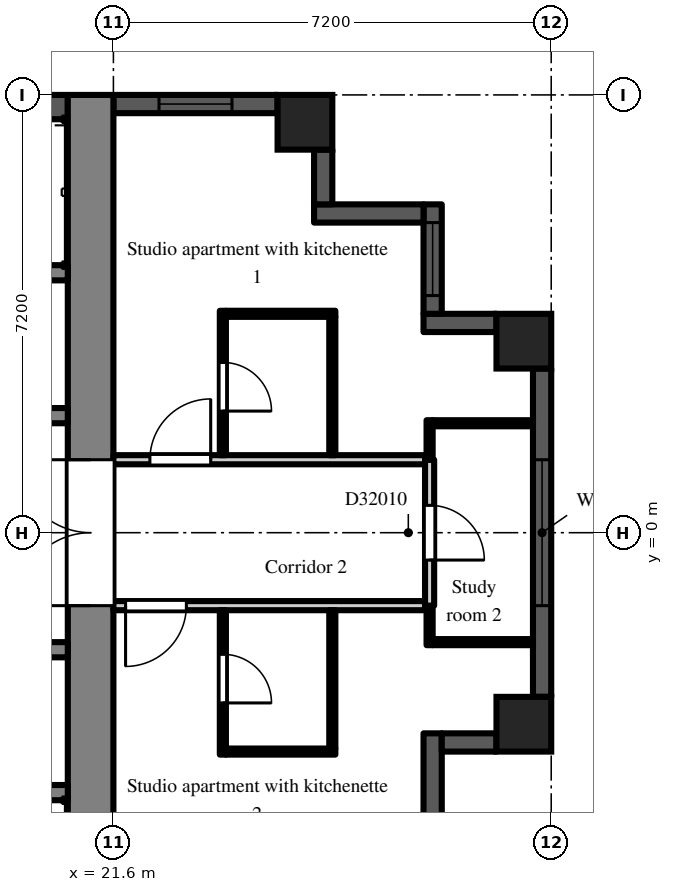
"""IFC4 building model, lengths in metres.
Left out: names, types, materials, properties, quantities, classifications, styles, units other than length and angle.
Written with IfcOpenShell. Run it as: python <this file> out.ifc"""

import sys

from ifc_helpers import new_model, si_unit, direction, frame, frame_2d, origin, origin_2d, place, context, subcontext, project, spatial, rectangle, extrude, element, fill, save


model = new_model("IFC4")
c1 = context("Model", 3, precision=1e-05, world=origin(), true_north=direction((0.0, 1.0)))
c2 = subcontext(c1, "Body", "Model", "MODEL_VIEW")
j1 = project(units=[si_unit("LENGTHUNIT", "METRE"), si_unit("PLANEANGLEUNIT", "RADIAN")], contexts=[c1])
p1 = place(None, origin())
s1 = spatial("IfcSite", under=j1, at=p1, CompositionType="ELEMENT")
p2 = place(p1, origin())
s2 = spatial("IfcBuilding", under=s1, at=p2, CompositionType="ELEMENT")
p3 = place(p2, frame((0.0, 0.0, 225.9)))
s3 = spatial("IfcBuildingStorey", under=s2, at=p3, CompositionType="ELEMENT", Elevation=225.9)
for number, where, z_axis, x_axis in (
    (1, (24.75, 6.75, 0.0), (0.0, 0.0, 1.0), (1.0, 0.0, 0.0)),
    (2, (28.35, -3.15, 0.0), (0.0, 0.0, 1.0), (1.0, 0.0, 0.0)),
    (3, (28.35, 3.15, 0.0), (0.0, 0.0, 1.0), (1.0, 0.0, 0.0)),
):
    element("IfcColumn", number, at=place(p3, frame(where, z_axis=z_axis, x_axis=x_axis)), inside=s3, PredefinedType="COLUMN", context=c2, shape_type="SweptSolid", body=[
        extrude(rectangle(XDim=0.9, YDim=0.9, at=origin_2d()), origin(), (0.0, 0.0, 1.0), 3.0),
    ])
p4 = place(p3, frame((26.85, -5.1, 0.0), z_axis=(0.0, 0.0, 1.0), x_axis=(0.0, 1.0, 0.0)))
e4 = element("IfcWall", 4, at=p4, inside=s3, PredefinedType="SOLIDWALL", context=c2, shape_type="SweptSolid", body=[
    extrude(rectangle(XDim=1.8, YDim=0.3, at=frame_2d((0.9, 0.0))), origin(), (0.0, 0.0, 1.0), 2.6),
])
p5 = place(p3, frame((27.0, -3.45, 0.0), z_axis=(0.0, 0.0, 1.0), x_axis=(1.0, 0.0, 0.0)))
e5 = element("IfcWall", 5, at=p5, inside=s3, PredefinedType="SOLIDWALL", context=c2, shape_type="SweptSolid", body=[
    extrude(rectangle(XDim=0.9, YDim=0.3, at=frame_2d((0.45, 0.0))), origin(), (0.0, 0.0, 1.0), 2.6),
])
p6 = place(p3, frame((28.65, -2.7, 0.0), z_axis=(0.0, 0.0, 1.0), x_axis=(0.0, 1.0, 0.0)))
e6 = element("IfcWall", 6, at=p6, inside=s3, PredefinedType="SOLIDWALL", context=c2, shape_type="SweptSolid", body=[
    extrude(rectangle(XDim=5.4, YDim=0.3, at=frame_2d((2.7, 0.0))), origin(), (0.0, 0.0, 1.0), 2.3),
])
p7 = place(p6, frame((1.5, 0.0, 0.2)))
e7 = element("IfcOpeningElement", 7, at=p7, cuts=e6, PredefinedType="OPENING", context=c2, shape_type="SweptSolid", body=[
    extrude(rectangle(XDim=2.4, YDim=1.85, at=frame_2d((1.2, 0.925))), frame((0.0, 0.16, 0.0), z_axis=(0.0, -1.0, 0.0), x_axis=(1.0, 0.0, 0.0)), (0.0, 0.0, 1.0), 0.32),
])
p8 = place(p3, frame((27.9, 3.45, 0.0), z_axis=(0.0, 0.0, 1.0), x_axis=(-1.0, 0.0, 0.0)))
e8 = element("IfcWall", 8, at=p8, inside=s3, PredefinedType="SOLIDWALL", context=c2, shape_type="SweptSolid", body=[
    extrude(rectangle(XDim=1.2, YDim=0.3, at=frame_2d((0.6, 0.0))), origin(), (0.0, 0.0, 1.0), 2.6),
])
p9 = place(p3, frame((26.85, 3.6, 0.0), z_axis=(0.0, 0.0, 1.0), x_axis=(0.0, 1.0, 0.0)))
e9 = element("IfcWall", 9, at=p9, inside=s3, PredefinedType="SOLIDWALL", context=c2, shape_type="SweptSolid", body=[
    extrude(rectangle(XDim=1.8, YDim=0.3, at=frame_2d((0.9, 0.0))), origin(), (0.0, 0.0, 1.0), 2.6),
])
p10 = place(p9, frame((0.3, 0.0, 0.2)))
e10 = element("IfcOpeningElement", 10, at=p10, cuts=e9, PredefinedType="OPENING", context=c2, shape_type="SweptSolid", body=[
    extrude(rectangle(XDim=1.2, YDim=1.85, at=frame_2d((0.6, 0.925))), frame((0.0, 0.16, 0.0), z_axis=(0.0, -1.0, 0.0), x_axis=(1.0, 0.0, 0.0)), (0.0, 0.0, 1.0), 0.32),
])
p11 = place(p3, frame((26.7, 5.25, 0.0), z_axis=(0.0, 0.0, 1.0), x_axis=(-1.0, 0.0, 0.0)))
e11 = element("IfcWall", 11, at=p11, inside=s3, PredefinedType="SOLIDWALL", context=c2, shape_type="SweptSolid", body=[
    extrude(rectangle(XDim=1.8, YDim=0.3, at=frame_2d((0.9, 0.0))), origin(), (0.0, 0.0, 1.0), 2.6),
])
p12 = place(p3, frame((25.05, 5.4, 0.0), z_axis=(0.0, 0.0, 1.0), x_axis=(0.0, 1.0, 0.0)))
e12 = element("IfcWall", 12, at=p12, inside=s3, PredefinedType="SOLIDWALL", context=c2, shape_type="SweptSolid", body=[
    extrude(rectangle(XDim=0.9, YDim=0.3, at=frame_2d((0.45, 0.0))), origin(), (0.0, 0.0, 1.0), 2.6),
])
p13 = place(p3, frame((24.3, 7.05, 0.0), z_axis=(0.0, 0.0, 1.0), x_axis=(-1.0, 0.0, 0.0)))
e13 = element("IfcWall", 13, at=p13, inside=s3, PredefinedType="SOLIDWALL", context=c2, shape_type="SweptSolid", body=[
    extrude(rectangle(XDim=2.7, YDim=0.3, at=frame_2d((1.35, 0.0))), origin(), (0.0, 0.0, 1.0), 2.3),
])
p14 = place(p13, frame((0.75, 0.0, 0.2)))
e14 = element("IfcOpeningElement", 14, at=p14, cuts=e13, PredefinedType="OPENING", context=c2, shape_type="SweptSolid", body=[
    extrude(rectangle(XDim=1.2, YDim=1.85, at=frame_2d((0.6, 0.925))), frame((0.0, 0.16, 0.0), z_axis=(0.0, -1.0, 0.0), x_axis=(1.0, 0.0, 0.0)), (0.0, 0.0, 1.0), 0.32),
])
p15 = place(p3, frame((21.225, -7.2, 0.0), z_axis=(0.0, 0.0, 1.0), x_axis=(0.0, 1.0, 0.0)))
e15 = element("IfcWall", 15, at=p15, inside=s3, PredefinedType="SHEAR", context=c2, shape_type="SweptSolid", body=[
    extrude(rectangle(XDim=14.4, YDim=0.75, at=frame_2d((7.2, 0.0))), origin(), (0.0, 0.0, 1.0), 2.6),
])
p16 = place(p15, frame((6.0, 0.0, 0.0)))
e16 = element("IfcOpeningElement", 16, at=p16, cuts=e15, PredefinedType="OPENING", context=c2, shape_type="SweptSolid", body=[
    extrude(rectangle(XDim=2.4, YDim=2.2, at=frame_2d((1.2, 1.1))), frame((0.0, 0.385, 0.0), z_axis=(0.0, -1.0, 0.0), x_axis=(1.0, 0.0, 0.0)), (0.0, 0.0, 1.0), 0.77),
])
p17 = place(p3, frame((7.9, 7.0, 0.0), z_axis=(0.0, 0.0, 1.0), x_axis=(1.0, 0.0, 0.0)))
e17 = element("IfcWall", 17, at=p17, inside=s3, PredefinedType="SHEAR", context=c2, shape_type="SweptSolid", body=[
    extrude(rectangle(XDim=12.95, YDim=0.4, at=frame_2d((6.475, 0.0))), origin(), (0.0, 0.0, 1.0), 2.6),
])
p18 = place(p3, frame((7.9, 1.925, 0.0), z_axis=(0.0, 0.0, 1.0), x_axis=(1.0, 0.0, 0.0)))
e18 = element("IfcWall", 18, at=p18, inside=s3, PredefinedType="SHEAR", context=c2, shape_type="SweptSolid", body=[
    extrude(rectangle(XDim=12.95, YDim=0.25, at=frame_2d((6.475, 0.0))), origin(), (0.0, 0.0, 1.0), 2.6),
])
p19 = place(p18, frame((4.825, 0.0, 0.0)))
e19 = element("IfcOpeningElement", 19, at=p19, cuts=e18, PredefinedType="OPENING", context=c2, shape_type="SweptSolid", body=[
    extrude(rectangle(XDim=1.1, YDim=2.1, at=frame_2d((0.55, 1.05))), frame((0.0, 0.135, 0.0), z_axis=(0.0, -1.0, 0.0), x_axis=(1.0, 0.0, 0.0)), (0.0, 0.0, 1.0), 0.27),
])
p20 = place(p18, frame((7.025, 0.0, 0.0)))
e20 = element("IfcOpeningElement", 20, at=p20, cuts=e18, PredefinedType="OPENING", context=c2, shape_type="SweptSolid", body=[
    extrude(rectangle(XDim=1.1, YDim=2.1, at=frame_2d((0.55, 1.05))), frame((0.0, 0.135, 0.0), z_axis=(0.0, -1.0, 0.0), x_axis=(1.0, 0.0, 0.0)), (0.0, 0.0, 1.0), 0.27),
])
p21 = place(p18, frame((9.225, 0.0, 0.0)))
e21 = element("IfcOpeningElement", 21, at=p21, cuts=e18, PredefinedType="OPENING", context=c2, shape_type="SweptSolid", body=[
    extrude(rectangle(XDim=1.1, YDim=2.1, at=frame_2d((0.55, 1.05))), frame((0.0, 0.135, 0.0), z_axis=(0.0, -1.0, 0.0), x_axis=(1.0, 0.0, 0.0)), (0.0, 0.0, 1.0), 0.27),
])
p22 = place(p18, frame((0.525, 0.0, 0.0)))
e22 = element("IfcOpeningElement", 22, at=p22, cuts=e18, PredefinedType="OPENING", context=c2, shape_type="SweptSolid", body=[
    extrude(rectangle(XDim=0.9, YDim=2.1, at=frame_2d((0.45, 1.05))), frame((0.0, 0.135, 0.0), z_axis=(0.0, -1.0, 0.0), x_axis=(1.0, 0.0, 0.0)), (0.0, 0.0, 1.0), 0.27),
])
p23 = place(p18, frame((2.625, 0.0, 0.0)))
e23 = element("IfcOpeningElement", 23, at=p23, cuts=e18, PredefinedType="OPENING", context=c2, shape_type="SweptSolid", body=[
    extrude(rectangle(XDim=1.1, YDim=2.1, at=frame_2d((0.55, 1.05))), frame((0.0, 0.135, 0.0), z_axis=(0.0, -1.0, 0.0), x_axis=(1.0, 0.0, 0.0)), (0.0, 0.0, 1.0), 0.27),
])
p24 = place(p18, frame((11.525, 0.0, 0.0)))
e24 = element("IfcOpeningElement", 24, at=p24, cuts=e18, PredefinedType="OPENING", context=c2, shape_type="SweptSolid", body=[
    extrude(rectangle(XDim=0.9, YDim=2.1, at=frame_2d((0.45, 1.05))), frame((0.0, 0.135, 0.0), z_axis=(0.0, -1.0, 0.0), x_axis=(1.0, 0.0, 0.0)), (0.0, 0.0, 1.0), 0.27),
])
p25 = place(p3, frame((12.3, 4.275, 0.0), z_axis=(0.0, 0.0, 1.0), x_axis=(1.0, 0.0, 0.0)))
e25 = element("IfcWall", 25, at=p25, inside=s3, PredefinedType="SHEAR", context=c2, shape_type="SweptSolid", body=[
    extrude(rectangle(XDim=8.55, YDim=0.25, at=frame_2d((4.275, 0.0))), origin(), (0.0, 0.0, 1.0), 2.6),
])
p26 = place(p3, frame((7.9, -1.925, 0.0), z_axis=(0.0, 0.0, 1.0), x_axis=(1.0, 0.0, 0.0)))
e26 = element("IfcWall", 26, at=p26, inside=s3, PredefinedType="SHEAR", context=c2, shape_type="SweptSolid", body=[
    extrude(rectangle(XDim=12.95, YDim=0.25, at=frame_2d((6.475, 0.0))), origin(), (0.0, 0.0, 1.0), 2.6),
])
p27 = place(p26, frame((0.525, 0.0, 0.0)))
e27 = element("IfcOpeningElement", 27, at=p27, cuts=e26, PredefinedType="OPENING", context=c2, shape_type="SweptSolid", body=[
    extrude(rectangle(XDim=0.9, YDim=2.1, at=frame_2d((0.45, 1.05))), frame((0.0, 0.135, 0.0), z_axis=(0.0, -1.0, 0.0), x_axis=(1.0, 0.0, 0.0)), (0.0, 0.0, 1.0), 0.27),
])
p28 = place(p26, frame((2.625, 0.0, 0.0)))
e28 = element("IfcOpeningElement", 28, at=p28, cuts=e26, PredefinedType="OPENING", context=c2, shape_type="SweptSolid", body=[
    extrude(rectangle(XDim=1.1, YDim=2.1, at=frame_2d((0.55, 1.05))), frame((0.0, 0.135, 0.0), z_axis=(0.0, -1.0, 0.0), x_axis=(1.0, 0.0, 0.0)), (0.0, 0.0, 1.0), 0.27),
])
p29 = place(p26, frame((6.025, 0.0, 0.0)))
e29 = element("IfcOpeningElement", 29, at=p29, cuts=e26, PredefinedType="OPENING", context=c2, shape_type="SweptSolid", body=[
    extrude(rectangle(XDim=0.9, YDim=2.1, at=frame_2d((0.45, 1.05))), frame((0.0, 0.135, 0.0), z_axis=(0.0, -1.0, 0.0), x_axis=(1.0, 0.0, 0.0)), (0.0, 0.0, 1.0), 0.27),
])
p30 = place(p26, frame((10.425, 0.0, 0.0)))
e30 = element("IfcOpeningElement", 30, at=p30, cuts=e26, PredefinedType="OPENING", context=c2, shape_type="SweptSolid", body=[
    extrude(rectangle(XDim=0.9, YDim=2.1, at=frame_2d((0.45, 1.05))), frame((0.0, 0.135, 0.0), z_axis=(0.0, -1.0, 0.0), x_axis=(1.0, 0.0, 0.0)), (0.0, 0.0, 1.0), 0.27),
])
p31 = place(p3, frame((12.3, -4.275, 0.0), z_axis=(0.0, 0.0, 1.0), x_axis=(1.0, 0.0, 0.0)))
e31 = element("IfcWall", 31, at=p31, inside=s3, PredefinedType="SHEAR", context=c2, shape_type="SweptSolid", body=[
    extrude(rectangle(XDim=8.55, YDim=0.25, at=frame_2d((4.275, 0.0))), origin(), (0.0, 0.0, 1.0), 2.6),
])
p32 = place(p3, frame((21.6, -1.2, 0.0), z_axis=(0.0, 0.0, 1.0), x_axis=(1.0, 0.0, 0.0)))
e32 = element("IfcWall", 32, at=p32, inside=s3, PredefinedType="PARTITIONING", context=c2, shape_type="SweptSolid", body=[
    extrude(rectangle(XDim=5.125, YDim=0.15, at=frame_2d((2.562, 0.0))), origin(), (0.0, 0.0, 1.0), 2.6),
])
p33 = place(p32, frame((0.2, 0.0, 0.0)))
e33 = element("IfcOpeningElement", 33, at=p33, cuts=e32, PredefinedType="OPENING", context=c2, shape_type="SweptSolid", body=[
    extrude(rectangle(XDim=1.0, YDim=2.1, at=frame_2d((0.5, 1.05))), frame((0.0, 0.085, 0.0), z_axis=(0.0, -1.0, 0.0), x_axis=(1.0, 0.0, 0.0)), (0.0, 0.0, 1.0), 0.17),
])
p34 = place(p3, frame((21.6, 1.2, 0.0), z_axis=(0.0, 0.0, 1.0), x_axis=(1.0, 0.0, 0.0)))
e34 = element("IfcWall", 34, at=p34, inside=s3, PredefinedType="PARTITIONING", context=c2, shape_type="SweptSolid", body=[
    extrude(rectangle(XDim=5.125, YDim=0.15, at=frame_2d((2.562, 0.0))), origin(), (0.0, 0.0, 1.0), 2.6),
])
p35 = place(p34, frame((0.6, 0.0, 0.0)))
e35 = element("IfcOpeningElement", 35, at=p35, cuts=e34, PredefinedType="OPENING", context=c2, shape_type="SweptSolid", body=[
    extrude(rectangle(XDim=1.0, YDim=2.1, at=frame_2d((0.5, 1.05))), frame((0.0, 0.085, 0.0), z_axis=(0.0, -1.0, 0.0), x_axis=(1.0, 0.0, 0.0)), (0.0, 0.0, 1.0), 0.17),
])
p36 = place(p3, frame((23.4, -3.65, 0.0), z_axis=(0.0, 0.0, 1.0), x_axis=(0.0, 1.0, 0.0)))
e36 = element("IfcWall", 36, at=p36, inside=s3, PredefinedType="PARTITIONING", context=c2, shape_type="SweptSolid", body=[
    extrude(rectangle(XDim=2.375, YDim=0.1, at=frame_2d((1.188, 0.0))), origin(), (0.0, 0.0, 1.0), 2.6),
])
p37 = place(p36, frame((0.85, 0.0, 0.0)))
e37 = element("IfcOpeningElement", 37, at=p37, cuts=e36, PredefinedType="OPENING", context=c2, shape_type="SweptSolid", body=[
    extrude(rectangle(XDim=0.8, YDim=2.1, at=frame_2d((0.4, 1.05))), frame((0.0, 0.06, 0.0), z_axis=(0.0, -1.0, 0.0), x_axis=(1.0, 0.0, 0.0)), (0.0, 0.0, 1.0), 0.12),
])
p38 = place(p3, frame((23.45, -3.6, 0.0), z_axis=(0.0, 0.0, 1.0), x_axis=(1.0, 0.0, 0.0)))
e38 = element("IfcWall", 38, at=p38, inside=s3, PredefinedType="PARTITIONING", context=c2, shape_type="SweptSolid", body=[
    extrude(rectangle(XDim=1.8, YDim=0.1, at=frame_2d((0.9, 0.0))), origin(), (0.0, 0.0, 1.0), 2.6),
])
p39 = place(p3, frame((23.4, 1.275, 0.0), z_axis=(0.0, 0.0, 1.0), x_axis=(0.0, 1.0, 0.0)))
e39 = element("IfcWall", 39, at=p39, inside=s3, PredefinedType="PARTITIONING", context=c2, shape_type="SweptSolid", body=[
    extrude(rectangle(XDim=2.375, YDim=0.1, at=frame_2d((1.188, 0.0))), origin(), (0.0, 0.0, 1.0), 2.6),
])
p40 = place(p39, frame((0.725, 0.0, 0.0)))
e40 = element("IfcOpeningElement", 40, at=p40, cuts=e39, PredefinedType="OPENING", context=c2, shape_type="SweptSolid", body=[
    extrude(rectangle(XDim=0.8, YDim=2.1, at=frame_2d((0.4, 1.05))), frame((0.0, 0.06, 0.0), z_axis=(0.0, -1.0, 0.0), x_axis=(1.0, 0.0, 0.0)), (0.0, 0.0, 1.0), 0.12),
])
p41 = place(p3, frame((23.45, 3.6, 0.0), z_axis=(0.0, 0.0, 1.0), x_axis=(1.0, 0.0, 0.0)))
e41 = element("IfcWall", 41, at=p41, inside=s3, PredefinedType="PARTITIONING", context=c2, shape_type="SweptSolid", body=[
    extrude(rectangle(XDim=1.8, YDim=0.1, at=frame_2d((0.9, 0.0))), origin(), (0.0, 0.0, 1.0), 2.6),
])
for number, where, z_axis, x_axis in (
    (42, (25.2, -3.55, 0.0), (0.0, 0.0, 1.0), (0.0, 1.0, 0.0)),
    (43, (25.2, 1.275, 0.0), (0.0, 0.0, 1.0), (0.0, 1.0, 0.0)),
):
    element("IfcWall", number, at=place(p3, frame(where, z_axis=z_axis, x_axis=x_axis)), inside=s3, PredefinedType="PARTITIONING", context=c2, shape_type="SweptSolid", body=[
        extrude(rectangle(XDim=2.275, YDim=0.1, at=frame_2d((1.138, 0.0))), origin(), (0.0, 0.0, 1.0), 2.6),
    ])
p42 = place(p3, frame((26.8, -1.85, 0.0), z_axis=(0.0, 0.0, 1.0), x_axis=(0.0, 1.0, 0.0)))
e44 = element("IfcWall", 44, at=p42, inside=s3, PredefinedType="PARTITIONING", context=c2, shape_type="SweptSolid", body=[
    extrude(rectangle(XDim=0.65, YDim=0.1, at=frame_2d((0.325, 0.0))), origin(), (0.0, 0.0, 1.0), 2.6),
])
p43 = place(p3, frame((26.85, -1.8, 0.0), z_axis=(0.0, 0.0, 1.0), x_axis=(1.0, 0.0, 0.0)))
e45 = element("IfcWall", 45, at=p43, inside=s3, PredefinedType="PARTITIONING", context=c2, shape_type="SweptSolid", body=[
    extrude(rectangle(XDim=1.65, YDim=0.1, at=frame_2d((0.825, 0.0))), origin(), (0.0, 0.0, 1.0), 2.6),
])
p44 = place(p3, frame((26.8, -1.2, 0.0), z_axis=(0.0, 0.0, 1.0), x_axis=(0.0, 1.0, 0.0)))
e46 = element("IfcWall", 46, at=p44, inside=s3, PredefinedType="PARTITIONING", context=c2, shape_type="SweptSolid", body=[
    extrude(rectangle(XDim=2.4, YDim=0.15, at=frame_2d((1.2, 0.0))), origin(), (0.0, 0.0, 1.0), 2.6),
])
p45 = place(p44, frame((0.75, 0.0, 0.0)))
e47 = element("IfcOpeningElement", 47, at=p45, cuts=e46, PredefinedType="OPENING", context=c2, shape_type="SweptSolid", body=[
    extrude(rectangle(XDim=0.9, YDim=2.1, at=frame_2d((0.45, 1.05))), frame((0.0, 0.085, 0.0), z_axis=(0.0, -1.0, 0.0), x_axis=(1.0, 0.0, 0.0)), (0.0, 0.0, 1.0), 0.17),
])
p46 = place(p3, frame((26.8, 1.2, 0.0), z_axis=(0.0, 0.0, 1.0), x_axis=(0.0, 1.0, 0.0)))
e48 = element("IfcWall", 48, at=p46, inside=s3, PredefinedType="PARTITIONING", context=c2, shape_type="SweptSolid", body=[
    extrude(rectangle(XDim=0.65, YDim=0.1, at=frame_2d((0.325, 0.0))), origin(), (0.0, 0.0, 1.0), 2.6),
])
p47 = place(p3, frame((26.85, 1.8, 0.0), z_axis=(0.0, 0.0, 1.0), x_axis=(1.0, 0.0, 0.0)))
e49 = element("IfcWall", 49, at=p47, inside=s3, PredefinedType="PARTITIONING", context=c2, shape_type="SweptSolid", body=[
    extrude(rectangle(XDim=1.65, YDim=0.1, at=frame_2d((0.825, 0.0))), origin(), (0.0, 0.0, 1.0), 2.6),
])
p48 = place(p7, origin())
e50 = element("IfcWindow", 50, at=p48, inside=s3, PartitioningType="SINGLE_PANEL", PredefinedType="WINDOW", context=c2, shape_type="SweptSolid", body=[
    extrude(rectangle(XDim=2.4, YDim=1.85, at=frame_2d((1.2, 0.925))), frame((0.0, 0.03, 0.0), z_axis=(0.0, -1.0, 0.0), x_axis=(1.0, 0.0, 0.0)), (0.0, 0.0, 1.0), 0.06),
])
fill(e7, e50)
p49 = place(p10, origin())
e51 = element("IfcWindow", 51, at=p49, inside=s3, PartitioningType="SINGLE_PANEL", PredefinedType="WINDOW", context=c2, shape_type="SweptSolid", body=[
    extrude(rectangle(XDim=1.2, YDim=1.85, at=frame_2d((0.6, 0.925))), frame((0.0, 0.03, 0.0), z_axis=(0.0, -1.0, 0.0), x_axis=(1.0, 0.0, 0.0)), (0.0, 0.0, 1.0), 0.06),
])
fill(e10, e51)
p50 = place(p14, origin())
e52 = element("IfcWindow", 52, at=p50, inside=s3, PartitioningType="SINGLE_PANEL", PredefinedType="WINDOW", context=c2, shape_type="SweptSolid", body=[
    extrude(rectangle(XDim=1.2, YDim=1.85, at=frame_2d((0.6, 0.925))), frame((0.0, 0.03, 0.0), z_axis=(0.0, -1.0, 0.0), x_axis=(1.0, 0.0, 0.0)), (0.0, 0.0, 1.0), 0.06),
])
fill(e14, e52)
p51 = place(p16, origin())
e53 = element("IfcDoor", 53, at=p51, inside=s3, OperationType="DOUBLE_DOOR_DOUBLE_SWING", PredefinedType="DOOR", context=c2, shape_type="SweptSolid", body=[
    extrude(rectangle(XDim=2.4, YDim=2.2, at=frame_2d((1.2, 1.1))), frame((0.0, 0.025, 0.0), z_axis=(0.0, -1.0, 0.0), x_axis=(1.0, 0.0, 0.0)), (0.0, 0.0, 1.0), 0.05),
])
fill(e16, e53)
p52 = place(p45, frame((0.9, 0.0, 0.0), z_axis=(0.0, 0.0, 1.0), x_axis=(-1.0, 0.0, 0.0)))
e54 = element("IfcDoor", 54, at=p52, inside=s3, OperationType="SINGLE_SWING_RIGHT", PredefinedType="DOOR", context=c2, shape_type="SweptSolid", body=[
    extrude(rectangle(XDim=0.9, YDim=2.1, at=frame_2d((0.45, 1.05))), frame((0.0, 0.025, 0.0), z_axis=(0.0, -1.0, 0.0), x_axis=(1.0, 0.0, 0.0)), (0.0, 0.0, 1.0), 0.05),
])
fill(e47, e54)
p53 = place(p40, frame((0.8, 0.0, 0.0), z_axis=(0.0, 0.0, 1.0), x_axis=(-1.0, 0.0, 0.0)))
e55 = element("IfcDoor", 55, at=p53, inside=s3, OperationType="SINGLE_SWING_RIGHT", PredefinedType="DOOR", context=c2, shape_type="SweptSolid", body=[
    extrude(rectangle(XDim=0.8, YDim=2.1, at=frame_2d((0.4, 1.05))), frame((0.0, 0.025, 0.0), z_axis=(0.0, -1.0, 0.0), x_axis=(1.0, 0.0, 0.0)), (0.0, 0.0, 1.0), 0.05),
])
fill(e40, e55)
p54 = place(p35, origin())
e56 = element("IfcDoor", 56, at=p54, inside=s3, OperationType="SINGLE_SWING_RIGHT", PredefinedType="DOOR", context=c2, shape_type="SweptSolid", body=[
    extrude(rectangle(XDim=1.0, YDim=2.1, at=frame_2d((0.5, 1.05))), frame((0.0, 0.025, 0.0), z_axis=(0.0, -1.0, 0.0), x_axis=(1.0, 0.0, 0.0)), (0.0, 0.0, 1.0), 0.05),
])
fill(e35, e56)
p55 = place(p37, frame((0.8, 0.0, 0.0), z_axis=(0.0, 0.0, 1.0), x_axis=(-1.0, 0.0, 0.0)))
e57 = element("IfcDoor", 57, at=p55, inside=s3, OperationType="SINGLE_SWING_RIGHT", PredefinedType="DOOR", context=c2, shape_type="SweptSolid", body=[
    extrude(rectangle(XDim=0.8, YDim=2.1, at=frame_2d((0.4, 1.05))), frame((0.0, 0.025, 0.0), z_axis=(0.0, -1.0, 0.0), x_axis=(1.0, 0.0, 0.0)), (0.0, 0.0, 1.0), 0.05),
])
fill(e37, e57)
p56 = place(p33, frame((1.0, 0.0, 0.0), z_axis=(0.0, 0.0, 1.0), x_axis=(-1.0, 0.0, 0.0)))
e58 = element("IfcDoor", 58, at=p56, inside=s3, OperationType="SINGLE_SWING_RIGHT", PredefinedType="DOOR", context=c2, shape_type="SweptSolid", body=[
    extrude(rectangle(XDim=1.0, YDim=2.1, at=frame_2d((0.5, 1.05))), frame((0.0, 0.025, 0.0), z_axis=(0.0, -1.0, 0.0), x_axis=(1.0, 0.0, 0.0)), (0.0, 0.0, 1.0), 0.05),
])
fill(e33, e58)
save(model, sys.argv[1])
